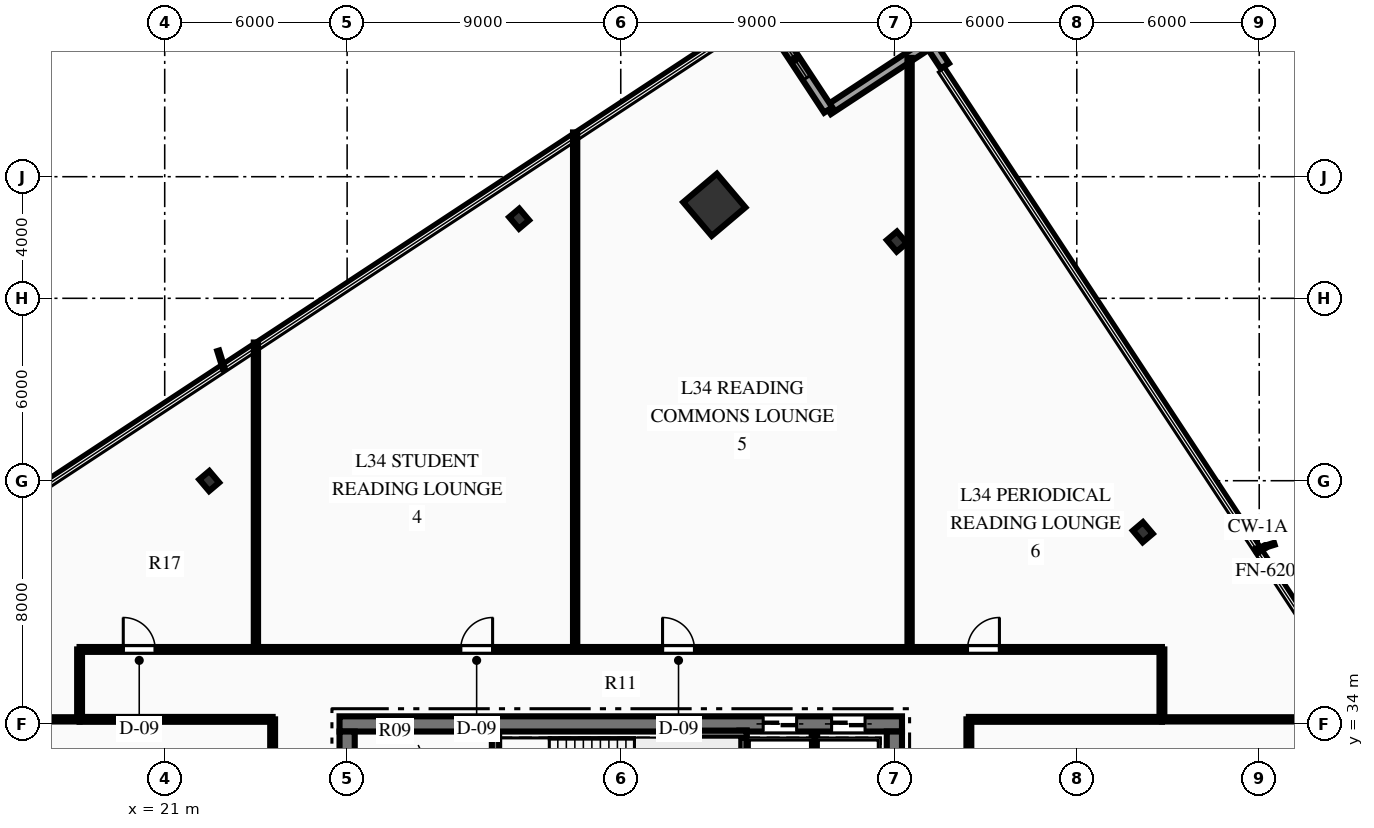
"""IFC4 building model, lengths in metres.
Left out: names, types, materials, properties, quantities, classifications, styles, units other than length and angle.
Written with IfcOpenShell. Run it as: python <this file> out.ifc"""

import sys

from ifc_helpers import new_model, si_unit, direction, frame, frame_2d, origin, origin_2d, place, context, subcontext, project, spatial, rectangle, hollow_rectangle, i_section, extrude, element, fill, save


model = new_model("IFC4")
c1 = context("Model", 3, precision=1e-05, world=origin(), true_north=direction((0.0, 1.0)))
c2 = subcontext(c1, "Body", "Model", "MODEL_VIEW")
j1 = project(units=[si_unit("LENGTHUNIT", "METRE"), si_unit("PLANEANGLEUNIT", "RADIAN")], contexts=[c1])
p1 = place(None, origin())
s1 = spatial("IfcSite", under=j1, at=p1, CompositionType="ELEMENT")
p2 = place(p1, origin())
s2 = spatial("IfcBuilding", under=s1, at=p2, CompositionType="ELEMENT")
p3 = place(p2, frame((0.0, 0.0, 140.7)))
s3 = spatial("IfcBuildingStorey", under=s2, at=p3, CompositionType="ELEMENT", Elevation=140.7)
p4 = place(p3, frame((26.75, 34.0, 0.0), z_axis=(0.0, 0.0, 1.0), x_axis=(1.0, 0.0, 0.0)))
e1 = element("IfcWall", 1, at=p4, inside=s3, PredefinedType="SHEAR", context=c2, shape_type="SweptSolid", body=[
    extrude(rectangle(XDim=18.5, YDim=0.5, at=frame_2d((9.25, 0.0))), origin(), (0.0, 0.0, 1.0), 3.75),
])
p5 = place(p4, frame((13.935, 0.0, 0.0)))
e2 = element("IfcOpeningElement", 2, at=p5, cuts=e1, PredefinedType="OPENING", context=c2, shape_type="SweptSolid", body=[
    extrude(rectangle(XDim=1.1, YDim=2.15, at=frame_2d((0.55, 1.075))), frame((0.0, 0.26, 0.0), z_axis=(0.0, -1.0, 0.0), x_axis=(1.0, 0.0, 0.0)), (0.0, 0.0, 1.0), 0.52),
])
p6 = place(p4, frame((16.185, 0.0, 0.0)))
e3 = element("IfcOpeningElement", 3, at=p6, cuts=e1, PredefinedType="OPENING", context=c2, shape_type="SweptSolid", body=[
    extrude(rectangle(XDim=1.1, YDim=2.15, at=frame_2d((0.55, 1.075))), frame((0.0, 0.26, 0.0), z_axis=(0.0, -1.0, 0.0), x_axis=(1.0, 0.0, 0.0)), (0.0, 0.0, 1.0), 0.52),
])
p7 = place(p3, frame((27.0, 18.25, 0.0), z_axis=(0.0, 0.0, 1.0), x_axis=(0.0, 1.0, 0.0)))
e4 = element("IfcWall", 4, at=p7, inside=s3, PredefinedType="SHEAR", context=c2, shape_type="SweptSolid", body=[
    extrude(rectangle(XDim=15.5, YDim=0.5, at=frame_2d((7.75, 0.0))), origin(), (0.0, 0.0, 1.0), 3.75),
])
p8 = place(p7, frame((9.99, 0.0, 0.0)))
e5 = element("IfcOpeningElement", 5, at=p8, cuts=e4, PredefinedType="OPENING", context=c2, shape_type="SweptSolid", body=[
    extrude(rectangle(XDim=1.4, YDim=2.2, at=frame_2d((0.7, 1.1))), frame((0.0, 0.26, 0.0), z_axis=(0.0, -1.0, 0.0), x_axis=(1.0, 0.0, 0.0)), (0.0, 0.0, 1.0), 0.52),
])
p9 = place(p3, frame((45.0, 18.25, 0.0), z_axis=(0.0, 0.0, 1.0), x_axis=(0.0, 1.0, 0.0)))
e6 = element("IfcWall", 6, at=p9, inside=s3, PredefinedType="SHEAR", context=c2, shape_type="SweptSolid", body=[
    extrude(rectangle(XDim=15.5, YDim=0.5, at=frame_2d((7.75, 0.0))), origin(), (0.0, 0.0, 1.0), 3.75),
])
p10 = place(p9, frame((9.99, 0.0, 0.0)))
e7 = element("IfcOpeningElement", 7, at=p10, cuts=e6, PredefinedType="OPENING", context=c2, shape_type="SweptSolid", body=[
    extrude(rectangle(XDim=1.4, YDim=2.2, at=frame_2d((0.7, 1.1))), frame((0.0, 0.26, 0.0), z_axis=(0.0, -1.0, 0.0), x_axis=(1.0, 0.0, 0.0)), (0.0, 0.0, 1.0), 0.52),
])
p11 = place(p3, frame((31.88, 29.93, 0.0), z_axis=(0.0, 0.0, 1.0), x_axis=(0.0, 1.0, 0.0)))
e8 = element("IfcWall", 8, at=p11, inside=s3, PredefinedType="SHEAR", context=c2, shape_type="SweptSolid", body=[
    extrude(rectangle(XDim=3.79, YDim=0.24, at=frame_2d((1.895, 0.0))), origin(), (0.0, 0.0, 1.0), 3.75),
])
p12 = place(p3, frame((40.02, 29.93, 0.0), z_axis=(0.0, 0.0, 1.0), x_axis=(0.0, 1.0, 0.0)))
e9 = element("IfcWall", 9, at=p12, inside=s3, PredefinedType="SHEAR", context=c2, shape_type="SweptSolid", body=[
    extrude(rectangle(XDim=3.85, YDim=0.24, at=frame_2d((1.925, 0.0))), origin(), (0.0, 0.0, 1.0), 3.75),
])
p13 = place(p3, frame((37.85, 33.66, 0.0), z_axis=(0.0, 0.0, 1.0), x_axis=(1.0, 0.0, 0.0)))
e10 = element("IfcWall", 10, at=p13, inside=s3, PredefinedType="SHEAR", context=c2, shape_type="SweptSolid", body=[
    extrude(rectangle(XDim=2.29, YDim=0.24, at=frame_2d((1.145, 0.0))), origin(), (0.0, 0.0, 1.0), 3.75),
])
p14 = place(p3, frame((39.077, 51.075, 0.0), z_axis=(0.0, 0.0, 1.0), x_axis=(0.763232469783, 0.646123979643, 0.0)))
e11 = element("IfcColumn", 11, at=p14, inside=s3, PredefinedType="COLUMN", context=c2, shape_type="SweptSolid", body=[
    extrude(hollow_rectangle(XDim=1.45, YDim=1.45, WallThickness=0.07, at=origin_2d()), origin(), (0.0, 0.0, 1.0), 3.75),
])
for number, where, z_axis, x_axis in (
    (12, (53.171, 40.307, 0.0), (0.0, 0.0, 1.0), (0.763, 0.646, 0.0)),
    (13, (45.08, 49.865, 0.0), (0.0, 0.0, 1.0), (0.763, 0.646, 0.0)),
    (14, (32.657, 50.619, 0.0), (0.0, 0.0, 1.0), (0.763, 0.646, 0.0)),
    (15, (22.464, 41.99, 0.0), (0.0, 0.0, 1.0), (0.763, 0.646, 0.0)),
):
    element("IfcColumn", number, at=place(p3, frame(where, z_axis=z_axis, x_axis=x_axis)), inside=s3, PredefinedType="COLUMN", context=c2, shape_type="SweptSolid", body=[
        extrude(i_section(OverallWidth=0.432, OverallDepth=0.498, WebThickness=0.056, FlangeThickness=0.089, at=origin_2d()), origin(), (0.0, 0.0, 1.0), 3.75),
    ])
p15 = place(p3, frame((46.165, 56.393, 0.0), z_axis=(0.0, 0.0, 1.0), x_axis=(0.549556717107, -0.835456411001, 0.0)))
e16 = element("IfcWall", 16, at=p15, inside=s3, PredefinedType="STANDARD", context=c2, shape_type="SweptSolid", body=[
    extrude(rectangle(XDim=0.9, YDim=0.32, at=frame_2d((0.45, 0.0))), origin(), (0.0, 0.0, 1.0), 3.46),
])
p16 = place(p3, frame((42.824, 54.194, 0.0), z_axis=(0.0, 0.0, 1.0), x_axis=(0.835303493264, 0.549789117881, 0.0)))
e17 = element("IfcWall", 17, at=p16, inside=s3, PredefinedType="STANDARD", context=c2, shape_type="SweptSolid", body=[
    extrude(rectangle(XDim=4.0, YDim=0.32, at=frame_2d((2.0, 0.0))), origin(), (0.0, 0.0, 1.0), 3.46),
])
p17 = place(p3, frame((40.625, 57.535, 0.0), z_axis=(0.0, 0.0, 1.0), x_axis=(0.549746530767, -0.835331522158, 0.0)))
e18 = element("IfcWall", 18, at=p17, inside=s3, PredefinedType="STANDARD", context=c2, shape_type="SweptSolid", body=[
    extrude(rectangle(XDim=4.0, YDim=0.32, at=frame_2d((2.0, 0.0))), origin(), (0.0, 0.0, 1.0), 3.46),
])
p18 = place(p17, frame((1.275, 0.0, 0.85)))
e19 = element("IfcOpeningElement", 19, at=p18, cuts=e18, PredefinedType="OPENING", context=c2, shape_type="SweptSolid", body=[
    extrude(rectangle(XDim=1.45, YDim=2.05, at=frame_2d((0.725, 1.025))), frame((0.0, 0.17, 0.0), z_axis=(0.0, -1.0, 0.0), x_axis=(1.0, 0.0, 0.0)), (0.0, 0.0, 1.0), 0.34),
])
p19 = place(p3, frame((42.37, 29.9, 0.0), z_axis=(0.0, 0.0, 1.0), x_axis=(0.0, 1.0, 0.0)))
e20 = element("IfcWall", 20, at=p19, inside=s3, PredefinedType="PARTITIONING", context=c2, shape_type="SweptSolid", body=[
    extrude(rectangle(XDim=3.75, YDim=0.18, at=frame_2d((1.875, 0.0))), origin(), (0.0, 0.0, 1.0), 3.46),
])
p20 = place(p3, frame((18.2, 36.45, 0.0), z_axis=(0.0, 0.0, 1.0), x_axis=(1.0, 0.0, 0.0)))
e21 = element("IfcWall", 21, at=p20, inside=s3, PredefinedType="PARTITIONING", context=c2, shape_type="SweptSolid", body=[
    extrude(rectangle(XDim=35.6, YDim=0.16, at=frame_2d((17.8, 0.0))), origin(), (0.0, 0.0, 1.0), 3.46),
])
p21 = place(p20, frame((1.437, 0.0, 0.0)))
e22 = element("IfcOpeningElement", 22, at=p21, cuts=e21, PredefinedType="OPENING", context=c2, shape_type="SweptSolid", body=[
    extrude(rectangle(XDim=1.05, YDim=2.15, at=frame_2d((0.525, 1.075))), frame((0.0, 0.09, 0.0), z_axis=(0.0, -1.0, 0.0), x_axis=(1.0, 0.0, 0.0)), (0.0, 0.0, 1.0), 0.18),
])
p22 = place(p20, frame((12.535, 0.0, 0.0)))
e23 = element("IfcOpeningElement", 23, at=p22, cuts=e21, PredefinedType="OPENING", context=c2, shape_type="SweptSolid", body=[
    extrude(rectangle(XDim=1.05, YDim=2.15, at=frame_2d((0.525, 1.075))), frame((0.0, 0.09, 0.0), z_axis=(0.0, -1.0, 0.0), x_axis=(1.0, 0.0, 0.0)), (0.0, 0.0, 1.0), 0.18),
])
p23 = place(p20, frame((19.175, 0.0, 0.0)))
e24 = element("IfcOpeningElement", 24, at=p23, cuts=e21, PredefinedType="OPENING", context=c2, shape_type="SweptSolid", body=[
    extrude(rectangle(XDim=1.05, YDim=2.15, at=frame_2d((0.525, 1.075))), frame((0.0, 0.09, 0.0), z_axis=(0.0, -1.0, 0.0), x_axis=(1.0, 0.0, 0.0)), (0.0, 0.0, 1.0), 0.18),
])
p24 = place(p20, frame((29.205, 0.0, 0.0)))
e25 = element("IfcOpeningElement", 25, at=p24, cuts=e21, PredefinedType="OPENING", context=c2, shape_type="SweptSolid", body=[
    extrude(rectangle(XDim=1.05, YDim=2.15, at=frame_2d((0.525, 1.075))), frame((0.0, 0.09, 0.0), z_axis=(0.0, -1.0, 0.0), x_axis=(1.0, 0.0, 0.0)), (0.0, 0.0, 1.0), 0.18),
])
for number, where, z_axis, x_axis in (
    (26, (18.2, 34.15, 0.0), (0.0, 0.0, 1.0), (1.0, 0.0, 0.0)),
    (27, (47.45, 34.15, 0.0), (0.0, 0.0, 1.0), (1.0, 0.0, 0.0)),
):
    element("IfcWall", number, at=place(p3, frame(where, z_axis=z_axis, x_axis=x_axis)), inside=s3, PredefinedType="PARTITIONING", context=c2, shape_type="SweptSolid", body=[
        extrude(rectangle(XDim=6.35, YDim=0.16, at=frame_2d((3.175, 0.0))), origin(), (0.0, 0.0, 1.0), 3.46),
    ])
p25 = place(p3, frame((24.55, 17.85, 0.0), z_axis=(0.0, 0.0, 1.0), x_axis=(0.0, 1.0, 0.0)))
e28 = element("IfcWall", 28, at=p25, inside=s3, PredefinedType="PARTITIONING", context=c2, shape_type="SweptSolid", body=[
    extrude(rectangle(XDim=16.3, YDim=0.16, at=frame_2d((8.15, 0.0))), origin(), (0.0, 0.0, 1.0), 3.46),
])
p26 = place(p25, frame((7.967, 0.0, 0.0)))
e29 = element("IfcOpeningElement", 29, at=p26, cuts=e28, PredefinedType="OPENING", context=c2, shape_type="SweptSolid", body=[
    extrude(rectangle(XDim=1.05, YDim=2.15, at=frame_2d((0.525, 1.075))), frame((0.0, 0.09, 0.0), z_axis=(0.0, -1.0, 0.0), x_axis=(1.0, 0.0, 0.0)), (0.0, 0.0, 1.0), 0.18),
])
p27 = place(p3, frame((47.45, 27.25, 0.0), z_axis=(0.0, 0.0, 1.0), x_axis=(0.0, 1.0, 0.0)))
e30 = element("IfcWall", 30, at=p27, inside=s3, PredefinedType="PARTITIONING", context=c2, shape_type="SweptSolid", body=[
    extrude(rectangle(XDim=6.9, YDim=0.16, at=frame_2d((3.45, 0.0))), origin(), (0.0, 0.0, 1.0), 3.46),
])
p28 = place(p27, frame((1.683, 0.0, 0.0)))
e31 = element("IfcOpeningElement", 31, at=p28, cuts=e30, PredefinedType="OPENING", context=c2, shape_type="SweptSolid", body=[
    extrude(rectangle(XDim=1.05, YDim=2.15, at=frame_2d((0.525, 1.075))), frame((0.0, 0.09, 0.0), z_axis=(0.0, -1.0, 0.0), x_axis=(1.0, 0.0, 0.0)), (0.0, 0.0, 1.0), 0.18),
])
for number, where, z_axis, x_axis in (
    (32, (18.2, 34.15, 0.0), (0.0, 0.0, 1.0), (0.0, 1.0, 0.0)),
    (33, (53.8, 34.15, 0.0), (0.0, 0.0, 1.0), (0.0, 1.0, 0.0)),
):
    element("IfcWall", number, at=place(p3, frame(where, z_axis=z_axis, x_axis=x_axis)), inside=s3, PredefinedType="PARTITIONING", context=c2, shape_type="SweptSolid", body=[
        extrude(rectangle(XDim=2.3, YDim=0.16, at=frame_2d((1.15, 0.0))), origin(), (0.0, 0.0, 1.0), 3.46),
    ])
p29 = place(p3, frame((5.305, 34.15, 0.0), z_axis=(0.0, 0.0, 1.0), x_axis=(1.0, 0.0, 0.0)))
e34 = element("IfcWall", 34, at=p29, inside=s3, PredefinedType="PARTITIONING", context=c2, shape_type="SweptSolid", body=[
    extrude(rectangle(XDim=12.895, YDim=0.14, at=frame_2d((6.448, 0.0))), origin(), (0.0, 0.0, 1.0), 3.46),
])
p30 = place(p3, frame((53.8, 34.15, 0.0), z_axis=(0.0, 0.0, 1.0), x_axis=(1.0, 0.0, 0.0)))
e35 = element("IfcWall", 35, at=p30, inside=s3, PredefinedType="PARTITIONING", context=c2, shape_type="SweptSolid", body=[
    extrude(rectangle(XDim=6.956, YDim=0.14, at=frame_2d((3.478, 0.0))), origin(), (0.0, 0.0, 1.0), 3.46),
])
p31 = place(p3, frame((24.0, 36.45, 0.0), z_axis=(0.0, 0.0, 1.0), x_axis=(0.0, 1.0, 0.0)))
e36 = element("IfcWall", 36, at=p31, inside=s3, PredefinedType="PARTITIONING", context=c2, shape_type="SweptSolid", body=[
    extrude(rectangle(XDim=10.096, YDim=0.14, at=frame_2d((5.048, 0.0))), origin(), (0.0, 0.0, 1.0), 3.46),
])
p32 = place(p3, frame((34.5, 36.45, 0.0), z_axis=(0.0, 0.0, 1.0), x_axis=(0.0, 1.0, 0.0)))
e37 = element("IfcWall", 37, at=p32, inside=s3, PredefinedType="PARTITIONING", context=c2, shape_type="SweptSolid", body=[
    extrude(rectangle(XDim=17.007, YDim=0.14, at=frame_2d((8.503, 0.0))), origin(), (0.0, 0.0, 1.0), 3.46),
])
p33 = place(p3, frame((45.5, 36.45, 0.0), z_axis=(0.0, 0.0, 1.0), x_axis=(0.0, 1.0, 0.0)))
e38 = element("IfcWall", 38, at=p33, inside=s3, PredefinedType="PARTITIONING", context=c2, shape_type="SweptSolid", body=[
    extrude(rectangle(XDim=19.458, YDim=0.14, at=frame_2d((9.729, 0.0))), origin(), (0.0, 0.0, 1.0), 3.46),
])
p34 = place(p18, origin())
e39 = element("IfcWindow", 39, at=p34, inside=s3, PartitioningType="SINGLE_PANEL", PredefinedType="WINDOW", context=c2, shape_type="SweptSolid", body=[
    extrude(rectangle(XDim=1.45, YDim=2.05, at=frame_2d((0.725, 1.025))), frame((0.0, 0.03, 0.0), z_axis=(0.0, -1.0, 0.0), x_axis=(1.0, 0.0, 0.0)), (0.0, 0.0, 1.0), 0.06),
])
fill(e19, e39)
p35 = place(p21, origin())
e40 = element("IfcDoor", 40, at=p35, inside=s3, OperationType="SINGLE_SWING_LEFT", PredefinedType="DOOR", context=c2, shape_type="SweptSolid", body=[
    extrude(rectangle(XDim=1.05, YDim=2.15, at=frame_2d((0.525, 1.075))), frame((0.0, 0.025, 0.0), z_axis=(0.0, -1.0, 0.0), x_axis=(1.0, 0.0, 0.0)), (0.0, 0.0, 1.0), 0.05),
])
fill(e22, e40)
p36 = place(p22, origin())
e41 = element("IfcDoor", 41, at=p36, inside=s3, OperationType="SINGLE_SWING_RIGHT", PredefinedType="DOOR", context=c2, shape_type="SweptSolid", body=[
    extrude(rectangle(XDim=1.05, YDim=2.15, at=frame_2d((0.525, 1.075))), frame((0.0, 0.025, 0.0), z_axis=(0.0, -1.0, 0.0), x_axis=(1.0, 0.0, 0.0)), (0.0, 0.0, 1.0), 0.05),
])
fill(e23, e41)
p37 = place(p23, origin())
e42 = element("IfcDoor", 42, at=p37, inside=s3, OperationType="SINGLE_SWING_LEFT", PredefinedType="DOOR", context=c2, shape_type="SweptSolid", body=[
    extrude(rectangle(XDim=1.05, YDim=2.15, at=frame_2d((0.525, 1.075))), frame((0.0, 0.025, 0.0), z_axis=(0.0, -1.0, 0.0), x_axis=(1.0, 0.0, 0.0)), (0.0, 0.0, 1.0), 0.05),
])
fill(e24, e42)
p38 = place(p24, origin())
e43 = element("IfcDoor", 43, at=p38, inside=s3, OperationType="SINGLE_SWING_RIGHT", PredefinedType="DOOR", context=c2, shape_type="SweptSolid", body=[
    extrude(rectangle(XDim=1.05, YDim=2.15, at=frame_2d((0.525, 1.075))), frame((0.0, 0.025, 0.0), z_axis=(0.0, -1.0, 0.0), x_axis=(1.0, 0.0, 0.0)), (0.0, 0.0, 1.0), 0.05),
])
fill(e25, e43)
p39 = place(p5, origin())
e44 = element("IfcDoor", 44, at=p39, inside=s3, OperationType="SLIDING_TO_LEFT", PredefinedType="DOOR", context=c2, shape_type="SweptSolid", body=[
    extrude(rectangle(XDim=1.1, YDim=2.15, at=frame_2d((0.55, 1.075))), frame((0.0, 0.025, 0.0), z_axis=(0.0, -1.0, 0.0), x_axis=(1.0, 0.0, 0.0)), (0.0, 0.0, 1.0), 0.05),
])
fill(e2, e44)
p40 = place(p6, origin())
e45 = element("IfcDoor", 45, at=p40, inside=s3, OperationType="SLIDING_TO_LEFT", PredefinedType="DOOR", context=c2, shape_type="SweptSolid", body=[
    extrude(rectangle(XDim=1.1, YDim=2.15, at=frame_2d((0.55, 1.075))), frame((0.0, 0.025, 0.0), z_axis=(0.0, -1.0, 0.0), x_axis=(1.0, 0.0, 0.0)), (0.0, 0.0, 1.0), 0.05),
])
fill(e3, e45)
save(model, sys.argv[1])
